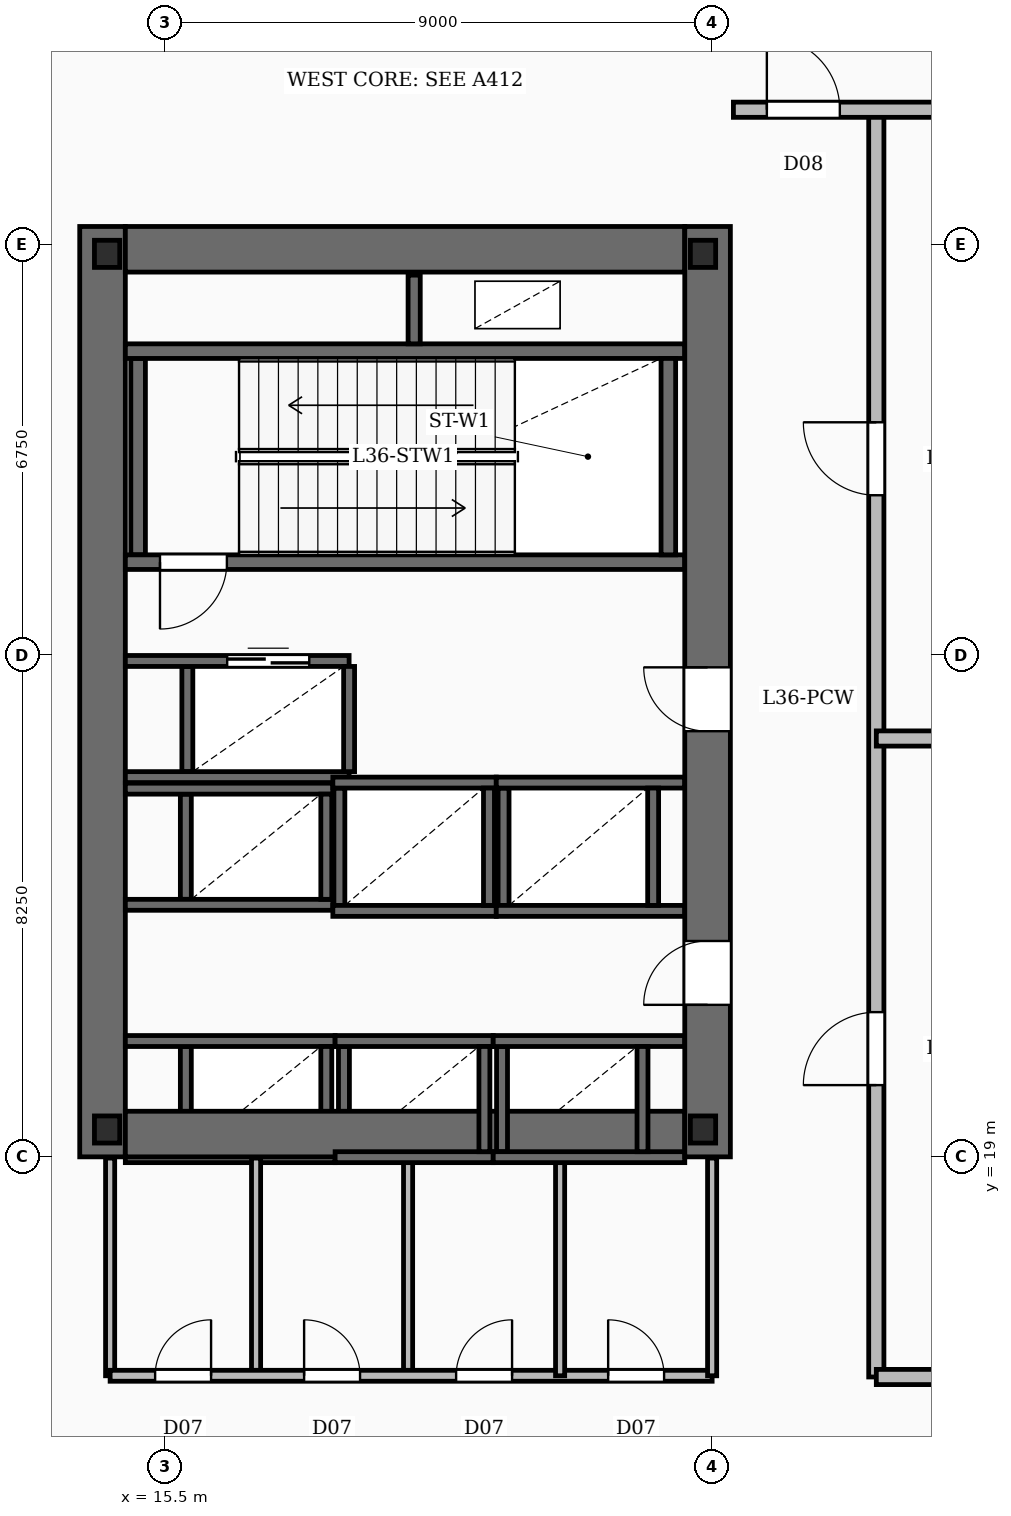
"""IFC4 building model, lengths in metres.
Left out: names, types, materials, properties, quantities, classifications, styles, units other than length and angle.
Written with IfcOpenShell. Run it as: python <this file> out.ifc"""

import sys

from ifc_helpers import new_model, si_unit, direction, frame, frame_2d, origin, origin_2d, place, context, subcontext, project, spatial, rectangle, i_section, extrude, element, fill, save


model = new_model("IFC4")
c1 = context("Model", 3, precision=1e-05, world=origin(), true_north=direction((0.0, 1.0)))
c2 = subcontext(c1, "Body", "Model", "MODEL_VIEW")
j1 = project(units=[si_unit("LENGTHUNIT", "METRE"), si_unit("PLANEANGLEUNIT", "RADIAN")], contexts=[c1])
p1 = place(None, origin())
s1 = spatial("IfcSite", under=j1, at=p1, CompositionType="ELEMENT")
p2 = place(p1, origin())
s2 = spatial("IfcBuilding", under=s1, at=p2, CompositionType="ELEMENT")
p3 = place(p2, frame((0.0, 0.0, 153.25)))
s3 = spatial("IfcBuildingStorey", under=s2, at=p3, CompositionType="ELEMENT", Elevation=153.25)
p4 = place(p3, frame((14.475, 19.0, -0.42), z_axis=(0.0, 0.0, 1.0), x_axis=(0.0, 1.0, 0.0)))
e1 = element("IfcWall", 1, at=p4, inside=s3, PredefinedType="SHEAR", context=c2, shape_type="SweptSolid", body=[
    extrude(rectangle(XDim=15.3, YDim=0.75, at=frame_2d((7.65, 0.0))), origin(), (0.0, 0.0, 1.0), 5.17),
])
p5 = place(p3, frame((24.425, 19.0, -0.42), z_axis=(0.0, 0.0, 1.0), x_axis=(0.0, 1.0, 0.0)))
e2 = element("IfcWall", 2, at=p5, inside=s3, PredefinedType="SHEAR", context=c2, shape_type="SweptSolid", body=[
    extrude(rectangle(XDim=15.3, YDim=0.75, at=frame_2d((7.65, 0.0))), origin(), (0.0, 0.0, 1.0), 5.17),
])
p6 = place(p5, frame((2.5, 0.0, 0.42)))
e3 = element("IfcOpeningElement", 3, at=p6, cuts=e2, PredefinedType="OPENING", context=c2, shape_type="SweptSolid", body=[
    extrude(rectangle(XDim=1.05, YDim=2.15, at=frame_2d((0.525, 1.075))), frame((0.0, 0.385, 0.0), z_axis=(0.0, -1.0, 0.0), x_axis=(1.0, 0.0, 0.0)), (0.0, 0.0, 1.0), 0.77),
])
p7 = place(p5, frame((7.0, 0.0, 0.42)))
e4 = element("IfcOpeningElement", 4, at=p7, cuts=e2, PredefinedType="OPENING", context=c2, shape_type="SweptSolid", body=[
    extrude(rectangle(XDim=1.05, YDim=2.15, at=frame_2d((0.525, 1.075))), frame((0.0, 0.385, 0.0), z_axis=(0.0, -1.0, 0.0), x_axis=(1.0, 0.0, 0.0)), (0.0, 0.0, 1.0), 0.77),
])
for number, where, z_axis, x_axis in (
    (5, (14.85, 19.375, -0.42), (0.0, 0.0, 1.0), (1.0, 0.0, 0.0)),
    (6, (14.85, 33.925, -0.42), (0.0, 0.0, 1.0), (1.0, 0.0, 0.0)),
):
    element("IfcWall", number, at=place(p3, frame(where, z_axis=z_axis, x_axis=x_axis)), inside=s3, PredefinedType="SHEAR", context=c2, shape_type="SweptSolid", body=[
        extrude(rectangle(XDim=9.2, YDim=0.75, at=frame_2d((4.6, 0.0))), origin(), (0.0, 0.0, 1.0), 5.17),
    ])
for number, where, z_axis, x_axis in (
    (7, (14.55, 19.45, -0.42), (0.0, 0.0, 1.0), (1.0, 0.0, 0.0)),
    (8, (24.35, 19.45, -0.42), (0.0, 0.0, 1.0), (1.0, 0.0, 0.0)),
    (9, (14.55, 33.85, -0.42), (0.0, 0.0, 1.0), (1.0, 0.0, 0.0)),
    (10, (24.35, 33.85, -0.42), (0.0, 0.0, 1.0), (1.0, 0.0, 0.0)),
):
    element("IfcColumn", number, at=place(p3, frame(where, z_axis=z_axis, x_axis=x_axis)), inside=s3, PredefinedType="COLUMN", context=c2, shape_type="SweptSolid", body=[
        extrude(i_section(OverallWidth=0.416, OverallDepth=0.446, WebThickness=0.039, FlangeThickness=0.063, FilletRadius=0.02, at=origin_2d()), origin(), (0.0, 0.0, 1.0), 5.17),
    ])
p8 = place(p3, frame((24.05, 28.78, 0.0), z_axis=(0.0, 0.0, 1.0), x_axis=(-1.0, 0.0, 0.0)))
e11 = element("IfcWall", 11, at=p8, inside=s3, PredefinedType="SOLIDWALL", context=c2, shape_type="SweptSolid", body=[
    extrude(rectangle(XDim=9.2, YDim=0.24, at=frame_2d((4.6, 0.0))), origin(), (0.0, 0.0, 1.0), 4.75),
])
p9 = place(p8, frame((7.53, 0.0, 0.0)))
e12 = element("IfcOpeningElement", 12, at=p9, cuts=e11, PredefinedType="OPENING", context=c2, shape_type="SweptSolid", body=[
    extrude(rectangle(XDim=1.1, YDim=2.15, at=frame_2d((0.55, 1.075))), frame((0.0, 0.13, 0.0), z_axis=(0.0, -1.0, 0.0), x_axis=(1.0, 0.0, 0.0)), (0.0, 0.0, 1.0), 0.26),
])
p10 = place(p3, frame((14.85, 32.25, 0.0), z_axis=(0.0, 0.0, 1.0), x_axis=(1.0, 0.0, 0.0)))
e13 = element("IfcWall", 13, at=p10, inside=s3, PredefinedType="SOLIDWALL", context=c2, shape_type="SweptSolid", body=[
    extrude(rectangle(XDim=9.2, YDim=0.24, at=frame_2d((4.6, 0.0))), origin(), (0.0, 0.0, 1.0), 4.75),
])
for number, where, z_axis, x_axis in (
    (14, (15.06, 28.9, 0.0), (0.0, 0.0, 1.0), (0.0, 1.0, 0.0)),
    (15, (23.78, 28.9, 0.0), (0.0, 0.0, 1.0), (0.0, 1.0, 0.0)),
):
    element("IfcWall", number, at=place(p3, frame(where, z_axis=z_axis, x_axis=x_axis)), inside=s3, PredefinedType="SOLIDWALL", context=c2, shape_type="SweptSolid", body=[
        extrude(rectangle(XDim=3.23, YDim=0.24, at=frame_2d((1.615, 0.0))), origin(), (0.0, 0.0, 1.0), 4.75),
    ])
p11 = place(p3, frame((19.6, 32.37, 0.0), z_axis=(0.0, 0.0, 1.0), x_axis=(0.0, 1.0, 0.0)))
e16 = element("IfcWall", 16, at=p11, inside=s3, PredefinedType="SOLIDWALL", context=c2, shape_type="SweptSolid", body=[
    extrude(rectangle(XDim=1.13, YDim=0.2, at=frame_2d((0.565, 0.0))), origin(), (0.0, 0.0, 1.0), 4.75),
])
for number, where, z_axis, x_axis in (
    (17, (14.85, 20.905, 0.0), (0.0, 0.0, 1.0), (1.0, 0.0, 0.0)),
    (18, (14.85, 18.995, 0.0), (0.0, 0.0, 1.0), (1.0, 0.0, 0.0)),
):
    element("IfcWall", number, at=place(p3, frame(where, z_axis=z_axis, x_axis=x_axis)), inside=s3, PredefinedType="SOLIDWALL", context=c2, shape_type="SweptSolid", body=[
        extrude(rectangle(XDim=3.45, YDim=0.18, at=frame_2d((1.725, 0.0))), origin(), (0.0, 0.0, 1.0), 4.75),
    ])
for number, where, z_axis, x_axis in (
    (19, (15.845, 19.085, 0.0), (0.0, 0.0, 1.0), (0.0, 1.0, 0.0)),
    (20, (18.155, 19.085, 0.0), (0.0, 0.0, 1.0), (0.0, 1.0, 0.0)),
):
    element("IfcWall", number, at=place(p3, frame(where, z_axis=z_axis, x_axis=x_axis)), inside=s3, PredefinedType="SOLIDWALL", context=c2, shape_type="SweptSolid", body=[
        extrude(rectangle(XDim=1.73, YDim=0.18, at=frame_2d((0.865, 0.0))), origin(), (0.0, 0.0, 1.0), 4.75),
    ])
for number, where, z_axis, x_axis in (
    (21, (18.3, 20.905, 0.0), (0.0, 0.0, 1.0), (1.0, 0.0, 0.0)),
    (22, (18.3, 18.995, 0.0), (0.0, 0.0, 1.0), (1.0, 0.0, 0.0)),
):
    element("IfcWall", number, at=place(p3, frame(where, z_axis=z_axis, x_axis=x_axis)), inside=s3, PredefinedType="SOLIDWALL", context=c2, shape_type="SweptSolid", body=[
        extrude(rectangle(XDim=2.6, YDim=0.18, at=frame_2d((1.3, 0.0))), origin(), (0.0, 0.0, 1.0), 4.75),
    ])
for number, where, z_axis, x_axis in (
    (23, (18.445, 19.085, 0.0), (0.0, 0.0, 1.0), (0.0, 1.0, 0.0)),
    (24, (20.755, 19.085, 0.0), (0.0, 0.0, 1.0), (0.0, 1.0, 0.0)),
):
    element("IfcWall", number, at=place(p3, frame(where, z_axis=z_axis, x_axis=x_axis)), inside=s3, PredefinedType="SOLIDWALL", context=c2, shape_type="SweptSolid", body=[
        extrude(rectangle(XDim=1.73, YDim=0.18, at=frame_2d((0.865, 0.0))), origin(), (0.0, 0.0, 1.0), 4.75),
    ])
for number, where, z_axis, x_axis in (
    (25, (20.9, 20.905, 0.0), (0.0, 0.0, 1.0), (1.0, 0.0, 0.0)),
    (26, (20.9, 18.995, 0.0), (0.0, 0.0, 1.0), (1.0, 0.0, 0.0)),
):
    element("IfcWall", number, at=place(p3, frame(where, z_axis=z_axis, x_axis=x_axis)), inside=s3, PredefinedType="SOLIDWALL", context=c2, shape_type="SweptSolid", body=[
        extrude(rectangle(XDim=3.15, YDim=0.18, at=frame_2d((1.575, 0.0))), origin(), (0.0, 0.0, 1.0), 4.75),
    ])
for number, where, z_axis, x_axis in (
    (27, (21.045, 19.085, 0.0), (0.0, 0.0, 1.0), (0.0, 1.0, 0.0)),
    (28, (23.355, 19.085, 0.0), (0.0, 0.0, 1.0), (0.0, 1.0, 0.0)),
):
    element("IfcWall", number, at=place(p3, frame(where, z_axis=z_axis, x_axis=x_axis)), inside=s3, PredefinedType="SOLIDWALL", context=c2, shape_type="SweptSolid", body=[
        extrude(rectangle(XDim=1.73, YDim=0.18, at=frame_2d((0.865, 0.0))), origin(), (0.0, 0.0, 1.0), 4.75),
    ])
for number, where, z_axis, x_axis in (
    (29, (14.85, 25.055, 0.0), (0.0, 0.0, 1.0), (1.0, 0.0, 0.0)),
    (30, (14.85, 23.145, 0.0), (0.0, 0.0, 1.0), (1.0, 0.0, 0.0)),
):
    element("IfcWall", number, at=place(p3, frame(where, z_axis=z_axis, x_axis=x_axis)), inside=s3, PredefinedType="SOLIDWALL", context=c2, shape_type="SweptSolid", body=[
        extrude(rectangle(XDim=3.412, YDim=0.18, at=frame_2d((1.706, 0.0))), origin(), (0.0, 0.0, 1.0), 4.75),
    ])
for number, where, z_axis, x_axis in (
    (31, (15.845, 23.235, 0.0), (0.0, 0.0, 1.0), (0.0, 1.0, 0.0)),
    (32, (18.155, 23.235, 0.0), (0.0, 0.0, 1.0), (0.0, 1.0, 0.0)),
):
    element("IfcWall", number, at=place(p3, frame(where, z_axis=z_axis, x_axis=x_axis)), inside=s3, PredefinedType="SOLIDWALL", context=c2, shape_type="SweptSolid", body=[
        extrude(rectangle(XDim=1.73, YDim=0.18, at=frame_2d((0.865, 0.0))), origin(), (0.0, 0.0, 1.0), 4.75),
    ])
for number, where, z_axis, x_axis in (
    (33, (18.262, 25.155, 0.0), (0.0, 0.0, 1.0), (1.0, 0.0, 0.0)),
    (34, (18.262, 23.045, 0.0), (0.0, 0.0, 1.0), (1.0, 0.0, 0.0)),
):
    element("IfcWall", number, at=place(p3, frame(where, z_axis=z_axis, x_axis=x_axis)), inside=s3, PredefinedType="SOLIDWALL", context=c2, shape_type="SweptSolid", body=[
        extrude(rectangle(XDim=2.688, YDim=0.18, at=frame_2d((1.344, 0.0))), origin(), (0.0, 0.0, 1.0), 4.75),
    ])
for number, where, z_axis, x_axis in (
    (35, (18.37, 23.135, 0.0), (0.0, 0.0, 1.0), (0.0, 1.0, 0.0)),
    (36, (20.83, 23.135, 0.0), (0.0, 0.0, 1.0), (0.0, 1.0, 0.0)),
):
    element("IfcWall", number, at=place(p3, frame(where, z_axis=z_axis, x_axis=x_axis)), inside=s3, PredefinedType="SOLIDWALL", context=c2, shape_type="SweptSolid", body=[
        extrude(rectangle(XDim=1.93, YDim=0.18, at=frame_2d((0.965, 0.0))), origin(), (0.0, 0.0, 1.0), 4.75),
    ])
for number, where, z_axis, x_axis in (
    (37, (20.95, 25.155, 0.0), (0.0, 0.0, 1.0), (1.0, 0.0, 0.0)),
    (38, (20.95, 23.045, 0.0), (0.0, 0.0, 1.0), (1.0, 0.0, 0.0)),
):
    element("IfcWall", number, at=place(p3, frame(where, z_axis=z_axis, x_axis=x_axis)), inside=s3, PredefinedType="SOLIDWALL", context=c2, shape_type="SweptSolid", body=[
        extrude(rectangle(XDim=3.1, YDim=0.18, at=frame_2d((1.55, 0.0))), origin(), (0.0, 0.0, 1.0), 4.75),
    ])
for number, where, z_axis, x_axis in (
    (39, (21.07, 23.135, 0.0), (0.0, 0.0, 1.0), (0.0, 1.0, 0.0)),
    (40, (23.53, 23.135, 0.0), (0.0, 0.0, 1.0), (0.0, 1.0, 0.0)),
):
    element("IfcWall", number, at=place(p3, frame(where, z_axis=z_axis, x_axis=x_axis)), inside=s3, PredefinedType="SOLIDWALL", context=c2, shape_type="SweptSolid", body=[
        extrude(rectangle(XDim=1.93, YDim=0.18, at=frame_2d((0.965, 0.0))), origin(), (0.0, 0.0, 1.0), 4.75),
    ])
p12 = place(p3, frame((14.85, 27.155, 0.0), z_axis=(0.0, 0.0, 1.0), x_axis=(1.0, 0.0, 0.0)))
e41 = element("IfcWall", 41, at=p12, inside=s3, PredefinedType="SOLIDWALL", context=c2, shape_type="SweptSolid", body=[
    extrude(rectangle(XDim=3.68, YDim=0.18, at=frame_2d((1.84, 0.0))), origin(), (0.0, 0.0, 1.0), 4.75),
])
p13 = place(p12, frame((1.675, 0.0, 0.0)))
e42 = element("IfcOpeningElement", 42, at=p13, cuts=e41, PredefinedType="OPENING", context=c2, shape_type="SweptSolid", body=[
    extrude(rectangle(XDim=1.35, YDim=2.3, at=frame_2d((0.675, 1.15))), frame((0.0, 0.1, 0.0), z_axis=(0.0, -1.0, 0.0), x_axis=(1.0, 0.0, 0.0)), (0.0, 0.0, 1.0), 0.2),
])
p14 = place(p3, frame((14.85, 25.245, 0.0), z_axis=(0.0, 0.0, 1.0), x_axis=(1.0, 0.0, 0.0)))
e43 = element("IfcWall", 43, at=p14, inside=s3, PredefinedType="SOLIDWALL", context=c2, shape_type="SweptSolid", body=[
    extrude(rectangle(XDim=3.68, YDim=0.18, at=frame_2d((1.84, 0.0))), origin(), (0.0, 0.0, 1.0), 4.75),
])
for number, where, z_axis, x_axis in (
    (44, (15.87, 25.335, 0.0), (0.0, 0.0, 1.0), (0.0, 1.0, 0.0)),
    (45, (18.53, 25.335, 0.0), (0.0, 0.0, 1.0), (0.0, 1.0, 0.0)),
):
    element("IfcWall", number, at=place(p3, frame(where, z_axis=z_axis, x_axis=x_axis)), inside=s3, PredefinedType="SOLIDWALL", context=c2, shape_type="SweptSolid", body=[
        extrude(rectangle(XDim=1.73, YDim=0.18, at=frame_2d((0.865, 0.0))), origin(), (0.0, 0.0, 1.0), 4.75),
    ])
for number, where, z_axis, x_axis in (
    (46, (17.0, 15.4, 0.0), (0.0, 0.0, 1.0), (0.0, 1.0, 0.0)),
    (47, (19.5, 15.4, 0.0), (0.0, 0.0, 1.0), (0.0, 1.0, 0.0)),
    (48, (22.0, 15.4, 0.0), (0.0, 0.0, 1.0), (0.0, 1.0, 0.0)),
):
    element("IfcWall", number, at=place(p3, frame(where, z_axis=z_axis, x_axis=x_axis)), inside=s3, PredefinedType="PARTITIONING", context=c2, shape_type="SweptSolid", body=[
        extrude(rectangle(XDim=3.58, YDim=0.15, at=frame_2d((1.79, 0.0))), origin(), (0.0, 0.0, 1.0), 3.81),
    ])
p15 = place(p3, frame((14.6, 15.4, 0.0), z_axis=(0.0, 0.0, 1.0), x_axis=(1.0, 0.0, 0.0)))
e49 = element("IfcWall", 49, at=p15, inside=s3, PredefinedType="PARTITIONING", context=c2, shape_type="SweptSolid", body=[
    extrude(rectangle(XDim=9.9, YDim=0.18, at=frame_2d((4.95, 0.0))), origin(), (0.0, 0.0, 1.0), 3.81),
])
p16 = place(p15, frame((0.74, 0.0, 0.0)))
e50 = element("IfcOpeningElement", 50, at=p16, cuts=e49, PredefinedType="OPENING", context=c2, shape_type="SweptSolid", body=[
    extrude(rectangle(XDim=0.92, YDim=2.1, at=frame_2d((0.46, 1.05))), frame((0.0, 0.1, 0.0), z_axis=(0.0, -1.0, 0.0), x_axis=(1.0, 0.0, 0.0)), (0.0, 0.0, 1.0), 0.2),
])
p17 = place(p15, frame((3.19, 0.0, 0.0)))
e51 = element("IfcOpeningElement", 51, at=p17, cuts=e49, PredefinedType="OPENING", context=c2, shape_type="SweptSolid", body=[
    extrude(rectangle(XDim=0.92, YDim=2.1, at=frame_2d((0.46, 1.05))), frame((0.0, 0.1, 0.0), z_axis=(0.0, -1.0, 0.0), x_axis=(1.0, 0.0, 0.0)), (0.0, 0.0, 1.0), 0.2),
])
p18 = place(p15, frame((5.69, 0.0, 0.0)))
e52 = element("IfcOpeningElement", 52, at=p18, cuts=e49, PredefinedType="OPENING", context=c2, shape_type="SweptSolid", body=[
    extrude(rectangle(XDim=0.92, YDim=2.1, at=frame_2d((0.46, 1.05))), frame((0.0, 0.1, 0.0), z_axis=(0.0, -1.0, 0.0), x_axis=(1.0, 0.0, 0.0)), (0.0, 0.0, 1.0), 0.2),
])
p19 = place(p15, frame((8.19, 0.0, 0.0)))
e53 = element("IfcOpeningElement", 53, at=p19, cuts=e49, PredefinedType="OPENING", context=c2, shape_type="SweptSolid", body=[
    extrude(rectangle(XDim=0.92, YDim=2.1, at=frame_2d((0.46, 1.05))), frame((0.0, 0.1, 0.0), z_axis=(0.0, -1.0, 0.0), x_axis=(1.0, 0.0, 0.0)), (0.0, 0.0, 1.0), 0.2),
])
for number, where, z_axis, x_axis in (
    (54, (14.6, 15.4, 0.0), (0.0, 0.0, 1.0), (0.0, 1.0, 0.0)),
    (55, (24.5, 15.4, 0.0), (0.0, 0.0, 1.0), (0.0, 1.0, 0.0)),
):
    element("IfcWall", number, at=place(p3, frame(where, z_axis=z_axis, x_axis=x_axis)), inside=s3, PredefinedType="PARTITIONING", context=c2, shape_type="SweptSolid", body=[
        extrude(rectangle(XDim=3.58, YDim=0.15, at=frame_2d((1.79, 0.0))), origin(), (0.0, 0.0, 1.0), 2.8),
    ])
for number, where, z_axis, x_axis in (
    (56, (27.2, 25.88, 0.0), (0.0, 0.0, 1.0), (1.0, 0.0, 0.0)),
    (57, (27.2, 15.38, 0.0), (0.0, 0.0, 1.0), (1.0, 0.0, 0.0)),
):
    element("IfcWall", number, at=place(p3, frame(where, z_axis=z_axis, x_axis=x_axis)), inside=s3, PredefinedType="SOLIDWALL", context=c2, shape_type="SweptSolid", body=[
        extrude(rectangle(XDim=20.5, YDim=0.25, at=frame_2d((10.25, 0.0))), origin(), (0.0, 0.0, 1.0), 3.81),
    ])
p20 = place(p3, frame((24.85, 36.22, 0.0), z_axis=(0.0, 0.0, 1.0), x_axis=(1.0, 0.0, 0.0)))
e58 = element("IfcWall", 58, at=p20, inside=s3, PredefinedType="SOLIDWALL", context=c2, shape_type="SweptSolid", body=[
    extrude(rectangle(XDim=25.2, YDim=0.25, at=frame_2d((12.6, 0.0))), origin(), (0.0, 0.0, 1.0), 3.81),
])
p21 = place(p20, frame((0.55, 0.0, 0.0)))
e59 = element("IfcOpeningElement", 59, at=p21, cuts=e58, PredefinedType="OPENING", context=c2, shape_type="SweptSolid", body=[
    extrude(rectangle(XDim=1.2, YDim=2.2, at=frame_2d((0.6, 1.1))), frame((0.0, 0.135, 0.0), z_axis=(0.0, -1.0, 0.0), x_axis=(1.0, 0.0, 0.0)), (0.0, 0.0, 1.0), 0.27),
])
p22 = place(p3, frame((27.2, 15.38, 0.0), z_axis=(0.0, 0.0, 1.0), x_axis=(0.0, 1.0, 0.0)))
e60 = element("IfcWall", 60, at=p22, inside=s3, PredefinedType="SOLIDWALL", context=c2, shape_type="SweptSolid", body=[
    extrude(rectangle(XDim=20.84, YDim=0.25, at=frame_2d((10.42, 0.0))), origin(), (0.0, 0.0, 1.0), 3.81),
])
p23 = place(p22, frame((4.8, 0.0, 0.0)))
e61 = element("IfcOpeningElement", 61, at=p23, cuts=e60, PredefinedType="OPENING", context=c2, shape_type="SweptSolid", body=[
    extrude(rectangle(XDim=1.2, YDim=2.2, at=frame_2d((0.6, 1.1))), frame((0.0, 0.135, 0.0), z_axis=(0.0, -1.0, 0.0), x_axis=(1.0, 0.0, 0.0)), (0.0, 0.0, 1.0), 0.27),
])
p24 = place(p22, frame((14.5, 0.0, 0.0)))
e62 = element("IfcOpeningElement", 62, at=p24, cuts=e60, PredefinedType="OPENING", context=c2, shape_type="SweptSolid", body=[
    extrude(rectangle(XDim=1.2, YDim=2.2, at=frame_2d((0.6, 1.1))), frame((0.0, 0.135, 0.0), z_axis=(0.0, -1.0, 0.0), x_axis=(1.0, 0.0, 0.0)), (0.0, 0.0, 1.0), 0.27),
])
p25 = place(p6, origin())
e63 = element("IfcDoor", 63, at=p25, inside=s3, OperationType="SINGLE_SWING_LEFT", PredefinedType="DOOR", context=c2, shape_type="SweptSolid", body=[
    extrude(rectangle(XDim=1.05, YDim=2.15, at=frame_2d((0.525, 1.075))), frame((0.0, 0.025, 0.0), z_axis=(0.0, -1.0, 0.0), x_axis=(1.0, 0.0, 0.0)), (0.0, 0.0, 1.0), 0.05),
])
fill(e3, e63)
p26 = place(p7, origin())
e64 = element("IfcDoor", 64, at=p26, inside=s3, OperationType="SINGLE_SWING_RIGHT", PredefinedType="DOOR", context=c2, shape_type="SweptSolid", body=[
    extrude(rectangle(XDim=1.05, YDim=2.15, at=frame_2d((0.525, 1.075))), frame((0.0, 0.025, 0.0), z_axis=(0.0, -1.0, 0.0), x_axis=(1.0, 0.0, 0.0)), (0.0, 0.0, 1.0), 0.05),
])
fill(e4, e64)
p27 = place(p9, origin())
e65 = element("IfcDoor", 65, at=p27, inside=s3, OperationType="SINGLE_SWING_RIGHT", PredefinedType="DOOR", context=c2, shape_type="SweptSolid", body=[
    extrude(rectangle(XDim=1.1, YDim=2.15, at=frame_2d((0.55, 1.075))), frame((0.0, 0.025, 0.0), z_axis=(0.0, -1.0, 0.0), x_axis=(1.0, 0.0, 0.0)), (0.0, 0.0, 1.0), 0.05),
])
fill(e12, e65)
p28 = place(p13, origin())
e66 = element("IfcDoor", 66, at=p28, inside=s3, OperationType="DOUBLE_DOOR_SLIDING", PredefinedType="DOOR", context=c2, shape_type="SweptSolid", body=[
    extrude(rectangle(XDim=1.35, YDim=2.3, at=frame_2d((0.675, 1.15))), frame((0.0, 0.025, 0.0), z_axis=(0.0, -1.0, 0.0), x_axis=(1.0, 0.0, 0.0)), (0.0, 0.0, 1.0), 0.05),
])
fill(e42, e66)
p29 = place(p16, origin())
e67 = element("IfcDoor", 67, at=p29, inside=s3, OperationType="SINGLE_SWING_RIGHT", PredefinedType="DOOR", context=c2, shape_type="SweptSolid", body=[
    extrude(rectangle(XDim=0.92, YDim=2.1, at=frame_2d((0.46, 1.05))), frame((0.0, 0.025, 0.0), z_axis=(0.0, -1.0, 0.0), x_axis=(1.0, 0.0, 0.0)), (0.0, 0.0, 1.0), 0.05),
])
fill(e50, e67)
p30 = place(p17, origin())
e68 = element("IfcDoor", 68, at=p30, inside=s3, OperationType="SINGLE_SWING_LEFT", PredefinedType="DOOR", context=c2, shape_type="SweptSolid", body=[
    extrude(rectangle(XDim=0.92, YDim=2.1, at=frame_2d((0.46, 1.05))), frame((0.0, 0.025, 0.0), z_axis=(0.0, -1.0, 0.0), x_axis=(1.0, 0.0, 0.0)), (0.0, 0.0, 1.0), 0.05),
])
fill(e51, e68)
p31 = place(p18, origin())
e69 = element("IfcDoor", 69, at=p31, inside=s3, OperationType="SINGLE_SWING_RIGHT", PredefinedType="DOOR", context=c2, shape_type="SweptSolid", body=[
    extrude(rectangle(XDim=0.92, YDim=2.1, at=frame_2d((0.46, 1.05))), frame((0.0, 0.025, 0.0), z_axis=(0.0, -1.0, 0.0), x_axis=(1.0, 0.0, 0.0)), (0.0, 0.0, 1.0), 0.05),
])
fill(e52, e69)
p32 = place(p19, origin())
e70 = element("IfcDoor", 70, at=p32, inside=s3, OperationType="SINGLE_SWING_LEFT", PredefinedType="DOOR", context=c2, shape_type="SweptSolid", body=[
    extrude(rectangle(XDim=0.92, YDim=2.1, at=frame_2d((0.46, 1.05))), frame((0.0, 0.025, 0.0), z_axis=(0.0, -1.0, 0.0), x_axis=(1.0, 0.0, 0.0)), (0.0, 0.0, 1.0), 0.05),
])
fill(e53, e70)
p33 = place(p21, origin())
e71 = element("IfcDoor", 71, at=p33, inside=s3, OperationType="SINGLE_SWING_LEFT", PredefinedType="DOOR", context=c2, shape_type="SweptSolid", body=[
    extrude(rectangle(XDim=1.2, YDim=2.2, at=frame_2d((0.6, 1.1))), frame((0.0, 0.025, 0.0), z_axis=(0.0, -1.0, 0.0), x_axis=(1.0, 0.0, 0.0)), (0.0, 0.0, 1.0), 0.05),
])
fill(e59, e71)
p34 = place(p23, origin())
e72 = element("IfcDoor", 72, at=p34, inside=s3, OperationType="SINGLE_SWING_LEFT", PredefinedType="DOOR", context=c2, shape_type="SweptSolid", body=[
    extrude(rectangle(XDim=1.2, YDim=2.2, at=frame_2d((0.6, 1.1))), frame((0.0, 0.025, 0.0), z_axis=(0.0, -1.0, 0.0), x_axis=(1.0, 0.0, 0.0)), (0.0, 0.0, 1.0), 0.05),
])
fill(e61, e72)
p35 = place(p24, origin())
e73 = element("IfcDoor", 73, at=p35, inside=s3, OperationType="SINGLE_SWING_RIGHT", PredefinedType="DOOR", context=c2, shape_type="SweptSolid", body=[
    extrude(rectangle(XDim=1.2, YDim=2.2, at=frame_2d((0.6, 1.1))), frame((0.0, 0.025, 0.0), z_axis=(0.0, -1.0, 0.0), x_axis=(1.0, 0.0, 0.0)), (0.0, 0.0, 1.0), 0.05),
])
fill(e62, e73)
save(model, sys.argv[1])
